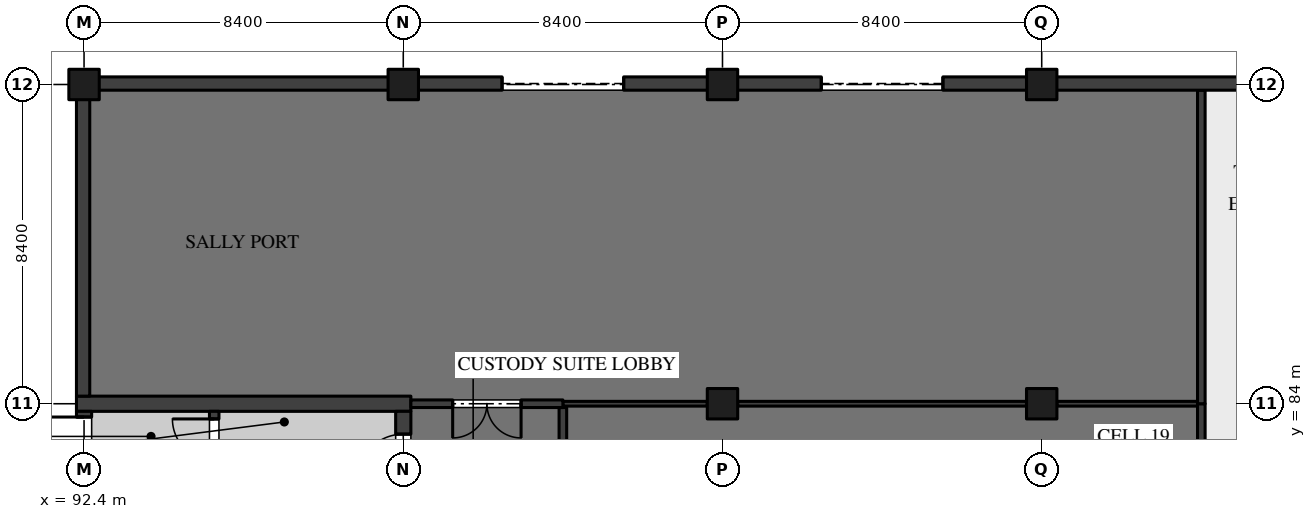
"""IFC4 building model, lengths in metres.
Left out: names, types, materials, properties, quantities, classifications, styles, units other than length and angle.
Written with IfcOpenShell. Run it as: python <this file> out.ifc"""

import sys

from ifc_helpers import new_model, si_unit, direction, frame, frame_2d, origin, origin_2d, place, context, subcontext, project, spatial, rectangle, extrude, element, fill, save


model = new_model("IFC4")
c1 = context("Model", 3, precision=1e-05, world=origin(), true_north=direction((0.0, 1.0)))
c2 = subcontext(c1, "Body", "Model", "MODEL_VIEW")
j1 = project(units=[si_unit("LENGTHUNIT", "METRE"), si_unit("PLANEANGLEUNIT", "RADIAN")], contexts=[c1])
p1 = place(None, origin())
s1 = spatial("IfcSite", under=j1, at=p1, CompositionType="ELEMENT")
p2 = place(p1, origin())
s2 = spatial("IfcBuilding", under=s1, at=p2, CompositionType="ELEMENT")
p3 = place(p2, origin())
s3 = spatial("IfcBuildingStorey", under=s2, at=p3, CompositionType="ELEMENT", Elevation=0.0)
for number, where, z_axis, x_axis in (
    (1, (92.4, 92.4, 0.0), (0.0, 0.0, 1.0), (1.0, 0.0, 0.0)),
    (2, (100.8, 92.4, 0.0), (0.0, 0.0, 1.0), (1.0, 0.0, 0.0)),
    (3, (109.2, 84.0, 0.0), (0.0, 0.0, 1.0), (1.0, 0.0, 0.0)),
    (4, (109.2, 92.4, 0.0), (0.0, 0.0, 1.0), (1.0, 0.0, 0.0)),
    (5, (117.6, 84.0, 0.0), (0.0, 0.0, 1.0), (1.0, 0.0, 0.0)),
    (6, (117.6, 92.4, 0.0), (0.0, 0.0, 1.0), (1.0, 0.0, 0.0)),
):
    element("IfcColumn", number, at=place(p3, frame(where, z_axis=z_axis, x_axis=x_axis)), inside=s3, PredefinedType="COLUMN", context=c2, shape_type="SweptSolid", body=[
        extrude(rectangle(XDim=0.8, YDim=0.8, at=origin_2d()), origin(), (0.0, 0.0, 1.0), 5.05),
    ])
p4 = place(p3, frame((92.2, 84.0, 0.0), z_axis=(0.0, 0.0, 1.0), x_axis=(1.0, 0.0, 0.0)))
e7 = element("IfcWall", 7, at=p4, inside=s3, PredefinedType="SHEAR", context=c2, shape_type="SweptSolid", body=[
    extrude(rectangle(XDim=8.8, YDim=0.4, at=frame_2d((4.4, 0.0))), origin(), (0.0, 0.0, 1.0), 5.05),
])
p5 = place(p3, frame((92.4, 75.8, 0.0), z_axis=(0.0, 0.0, 1.0), x_axis=(0.0, 1.0, 0.0)))
e8 = element("IfcWall", 8, at=p5, inside=s3, PredefinedType="SHEAR", context=c2, shape_type="SweptSolid", body=[
    extrude(rectangle(XDim=8.0, YDim=0.4, at=frame_2d((4.0, 0.0))), origin(), (0.0, 0.0, 1.0), 5.05),
])
p6 = place(p5, frame((6.65, 0.0, 0.0)))
e9 = element("IfcOpeningElement", 9, at=p6, cuts=e8, PredefinedType="OPENING", context=c2, shape_type="SweptSolid", body=[
    extrude(rectangle(XDim=1.2, YDim=2.1, at=frame_2d((0.6, 1.05))), frame((0.0, 0.21, 0.0), z_axis=(0.0, -1.0, 0.0), x_axis=(1.0, 0.0, 0.0)), (0.0, 0.0, 1.0), 0.42),
])
p7 = place(p3, frame((100.8, 75.8, 0.0), z_axis=(0.0, 0.0, 1.0), x_axis=(0.0, 1.0, 0.0)))
e10 = element("IfcWall", 10, at=p7, inside=s3, PredefinedType="SHEAR", context=c2, shape_type="SweptSolid", body=[
    extrude(rectangle(XDim=8.0, YDim=0.4, at=frame_2d((4.0, 0.0))), origin(), (0.0, 0.0, 1.0), 5.05),
])
p8 = place(p7, frame((6.2, 0.0, 0.0)))
e11 = element("IfcOpeningElement", 11, at=p8, cuts=e10, PredefinedType="OPENING", context=c2, shape_type="SweptSolid", body=[
    extrude(rectangle(XDim=1.2, YDim=2.1, at=frame_2d((0.6, 1.05))), frame((0.0, 0.21, 0.0), z_axis=(0.0, -1.0, 0.0), x_axis=(1.0, 0.0, 0.0)), (0.0, 0.0, 1.0), 0.42),
])
p9 = place(p3, frame((95.825, 83.8, 0.0), z_axis=(0.0, 0.0, 1.0), x_axis=(0.0, -1.0, 0.0)))
e12 = element("IfcWall", 12, at=p9, inside=s3, PredefinedType="SOLIDWALL", context=c2, shape_type="SweptSolid", body=[
    extrude(rectangle(XDim=8.0, YDim=0.25, at=frame_2d((4.0, 0.0))), origin(), (0.0, 0.0, 1.0), 5.05),
])
p10 = place(p9, frame((0.2, 0.0, 0.0)))
e13 = element("IfcOpeningElement", 13, at=p10, cuts=e12, PredefinedType="OPENING", context=c2, shape_type="SweptSolid", body=[
    extrude(rectangle(XDim=1.1, YDim=2.1, at=frame_2d((0.55, 1.05))), frame((0.0, 0.135, 0.0), z_axis=(0.0, -1.0, 0.0), x_axis=(1.0, 0.0, 0.0)), (0.0, 0.0, 1.0), 0.27),
])
p11 = place(p3, frame((105.0, 75.6, 0.0), z_axis=(0.0, 0.0, 1.0), x_axis=(0.0, 1.0, 0.0)))
e14 = element("IfcWall", 14, at=p11, inside=s3, PredefinedType="PARTITIONING", context=c2, shape_type="SweptSolid", body=[
    extrude(rectangle(XDim=8.3, YDim=0.2, at=frame_2d((4.15, 0.0))), origin(), (0.0, 0.0, 1.0), 5.05),
])
p12 = place(p11, frame((3.65, 0.0, 0.0)))
e15 = element("IfcOpeningElement", 15, at=p12, cuts=e14, PredefinedType="OPENING", context=c2, shape_type="SweptSolid", body=[
    extrude(rectangle(XDim=1.0, YDim=2.4, at=frame_2d((0.5, 1.2))), frame((0.0, 0.11, 0.0), z_axis=(0.0, -1.0, 0.0), x_axis=(1.0, 0.0, 0.0)), (0.0, 0.0, 1.0), 0.22),
])
p13 = place(p3, frame((105.0, 84.0, 0.0), z_axis=(0.0, 0.0, 1.0), x_axis=(1.0, 0.0, 0.0)))
e16 = element("IfcWall", 16, at=p13, inside=s3, PredefinedType="PARTITIONING", context=c2, shape_type="SweptSolid", body=[
    extrude(rectangle(XDim=3.8, YDim=0.125, at=frame_2d((1.9, 0.0))), origin(), (0.0, 0.0, 1.0), 5.05),
])
p14 = place(p3, frame((109.6, 84.0, 0.0), z_axis=(0.0, 0.0, 1.0), x_axis=(1.0, 0.0, 0.0)))
e17 = element("IfcWall", 17, at=p14, inside=s3, PredefinedType="PARTITIONING", context=c2, shape_type="SweptSolid", body=[
    extrude(rectangle(XDim=7.6, YDim=0.125, at=frame_2d((3.8, 0.0))), origin(), (0.0, 0.0, 1.0), 5.05),
])
p15 = place(p3, frame((118.0, 84.0, 0.0), z_axis=(0.0, 0.0, 1.0), x_axis=(1.0, 0.0, 0.0)))
e18 = element("IfcWall", 18, at=p15, inside=s3, PredefinedType="PARTITIONING", context=c2, shape_type="SweptSolid", body=[
    extrude(rectangle(XDim=3.7, YDim=0.125, at=frame_2d((1.85, 0.0))), origin(), (0.0, 0.0, 1.0), 5.05),
])
p16 = place(p3, frame((121.8, 75.7, 0.0), z_axis=(0.0, 0.0, 1.0), x_axis=(0.0, 1.0, 0.0)))
e19 = element("IfcWall", 19, at=p16, inside=s3, PredefinedType="PARTITIONING", context=c2, shape_type="SweptSolid", body=[
    extrude(rectangle(XDim=8.3, YDim=0.2, at=frame_2d((4.15, 0.0))), origin(), (0.0, 0.0, 1.0), 5.05),
])
p17 = place(p3, frame((101.0, 84.0, 0.0), z_axis=(0.0, 0.0, 1.0), x_axis=(1.0, 0.0, 0.0)))
e20 = element("IfcWall", 20, at=p17, inside=s3, PredefinedType="PARTITIONING", context=c2, shape_type="SweptSolid", body=[
    extrude(rectangle(XDim=4.0, YDim=0.2, at=frame_2d((2.0, 0.0))), origin(), (0.0, 0.0, 1.0), 5.05),
])
p18 = place(p17, frame((1.1, 0.0, 0.0)))
e21 = element("IfcOpeningElement", 21, at=p18, cuts=e20, PredefinedType="OPENING", context=c2, shape_type="SweptSolid", body=[
    extrude(rectangle(XDim=1.8, YDim=2.1, at=frame_2d((0.9, 1.05))), frame((0.0, 0.11, 0.0), z_axis=(0.0, -1.0, 0.0), x_axis=(1.0, 0.0, 0.0)), (0.0, 0.0, 1.0), 0.22),
])
p19 = place(p3, frame((121.8, 84.0, 0.0), z_axis=(0.0, 0.0, 1.0), x_axis=(0.0, 1.0, 0.0)))
e22 = element("IfcWall", 22, at=p19, inside=s3, PredefinedType="PARTITIONING", context=c2, shape_type="SweptSolid", body=[
    extrude(rectangle(XDim=8.25, YDim=0.2, at=frame_2d((4.125, 0.0))), origin(), (0.0, 0.0, 1.0), 5.05),
])
p20 = place(p3, frame((125.62, 92.425, 0.0), z_axis=(0.0, 0.0, 1.0), x_axis=(-1.0, 0.0, 0.0)))
e23 = element("IfcWall", 23, at=p20, inside=s3, PredefinedType="SOLIDWALL", context=c2, shape_type="SweptSolid", body=[
    extrude(rectangle(XDim=7.64, YDim=0.35, at=frame_2d((3.82, 0.0))), origin(), (0.0, 0.0, 1.0), 5.05),
])
p21 = place(p20, frame((0.82, 0.0, 0.0)))
e24 = element("IfcOpeningElement", 24, at=p21, cuts=e23, PredefinedType="OPENING", context=c2, shape_type="SweptSolid", body=[
    extrude(rectangle(XDim=1.8, YDim=2.4, at=frame_2d((0.9, 1.2))), frame((0.0, 0.185, 0.0), z_axis=(0.0, -1.0, 0.0), x_axis=(1.0, 0.0, 0.0)), (0.0, 0.0, 1.0), 0.37),
])
p22 = place(p3, frame((117.22, 92.425, 0.0), z_axis=(0.0, 0.0, 1.0), x_axis=(-1.0, 0.0, 0.0)))
e25 = element("IfcWall", 25, at=p22, inside=s3, PredefinedType="SOLIDWALL", context=c2, shape_type="SweptSolid", body=[
    extrude(rectangle(XDim=7.64, YDim=0.35, at=frame_2d((3.82, 0.0))), origin(), (0.0, 0.0, 1.0), 5.05),
])
p23 = place(p22, frame((2.22, 0.0, 0.0)))
e26 = element("IfcOpeningElement", 26, at=p23, cuts=e25, PredefinedType="OPENING", context=c2, shape_type="SweptSolid", body=[
    extrude(rectangle(XDim=3.2, YDim=4.5, at=frame_2d((1.6, 2.25))), frame((0.0, 0.185, 0.0), z_axis=(0.0, -1.0, 0.0), x_axis=(1.0, 0.0, 0.0)), (0.0, 0.0, 1.0), 0.37),
])
p24 = place(p3, frame((108.82, 92.425, 0.0), z_axis=(0.0, 0.0, 1.0), x_axis=(-1.0, 0.0, 0.0)))
e27 = element("IfcWall", 27, at=p24, inside=s3, PredefinedType="SOLIDWALL", context=c2, shape_type="SweptSolid", body=[
    extrude(rectangle(XDim=7.64, YDim=0.35, at=frame_2d((3.82, 0.0))), origin(), (0.0, 0.0, 1.0), 5.05),
])
p25 = place(p24, frame((2.22, 0.0, 0.0)))
e28 = element("IfcOpeningElement", 28, at=p25, cuts=e27, PredefinedType="OPENING", context=c2, shape_type="SweptSolid", body=[
    extrude(rectangle(XDim=3.2, YDim=4.5, at=frame_2d((1.6, 2.25))), frame((0.0, 0.185, 0.0), z_axis=(0.0, -1.0, 0.0), x_axis=(1.0, 0.0, 0.0)), (0.0, 0.0, 1.0), 0.37),
])
p26 = place(p3, frame((100.42, 92.425, 0.0), z_axis=(0.0, 0.0, 1.0), x_axis=(-1.0, 0.0, 0.0)))
e29 = element("IfcWall", 29, at=p26, inside=s3, PredefinedType="SOLIDWALL", context=c2, shape_type="SweptSolid", body=[
    extrude(rectangle(XDim=7.64, YDim=0.35, at=frame_2d((3.82, 0.0))), origin(), (0.0, 0.0, 1.0), 5.05),
])
p27 = place(p3, frame((92.375, 92.02, 0.0), z_axis=(0.0, 0.0, 1.0), x_axis=(0.0, -1.0, 0.0)))
e30 = element("IfcWall", 30, at=p27, inside=s3, PredefinedType="SOLIDWALL", context=c2, shape_type="SweptSolid", body=[
    extrude(rectangle(XDim=7.82, YDim=0.35, at=frame_2d((3.91, 0.0))), origin(), (0.0, 0.0, 1.0), 5.05),
])
p28 = place(p8, origin())
e31 = element("IfcDoor", 31, at=p28, inside=s3, OperationType="SINGLE_SWING_RIGHT", PredefinedType="DOOR", context=c2, shape_type="SweptSolid", body=[
    extrude(rectangle(XDim=1.2, YDim=2.1, at=frame_2d((0.6, 1.05))), frame((0.0, 0.035, 0.0), z_axis=(0.0, -1.0, 0.0), x_axis=(1.0, 0.0, 0.0)), (0.0, 0.0, 1.0), 0.07),
])
fill(e11, e31)
p29 = place(p10, frame((1.1, 0.0, 0.0), z_axis=(0.0, 0.0, 1.0), x_axis=(-1.0, 0.0, 0.0)))
e32 = element("IfcDoor", 32, at=p29, inside=s3, OperationType="SINGLE_SWING_LEFT", PredefinedType="DOOR", context=c2, shape_type="SweptSolid", body=[
    extrude(rectangle(XDim=1.1, YDim=2.1, at=frame_2d((0.55, 1.05))), frame((0.0, 0.035, 0.0), z_axis=(0.0, -1.0, 0.0), x_axis=(1.0, 0.0, 0.0)), (0.0, 0.0, 1.0), 0.07),
])
fill(e13, e32)
p30 = place(p6, origin())
e33 = element("IfcDoor", 33, at=p30, inside=s3, OperationType="SINGLE_SWING_LEFT", PredefinedType="DOOR", context=c2, shape_type="SweptSolid", body=[
    extrude(rectangle(XDim=1.2, YDim=2.1, at=frame_2d((0.6, 1.05))), frame((0.0, 0.035, 0.0), z_axis=(0.0, -1.0, 0.0), x_axis=(1.0, 0.0, 0.0)), (0.0, 0.0, 1.0), 0.07),
])
fill(e9, e33)
p31 = place(p18, frame((1.8, 0.0, 0.0), z_axis=(0.0, 0.0, 1.0), x_axis=(-1.0, 0.0, 0.0)))
e34 = element("IfcDoor", 34, at=p31, inside=s3, OperationType="DOUBLE_DOOR_SINGLE_SWING", PredefinedType="DOOR", context=c2, shape_type="SweptSolid", body=[
    extrude(rectangle(XDim=1.8, YDim=2.1, at=frame_2d((0.9, 1.05))), frame((0.0, 0.03, 0.0), z_axis=(0.0, -1.0, 0.0), x_axis=(1.0, 0.0, 0.0)), (0.0, 0.0, 1.0), 0.06),
])
fill(e21, e34)
p32 = place(p23, frame((3.2, 0.0, 0.0), z_axis=(0.0, 0.0, 1.0), x_axis=(-1.0, 0.0, 0.0)))
e35 = element("IfcDoor", 35, at=p32, inside=s3, OperationType="ROLLINGUP", PredefinedType="GATE", context=c2, shape_type="SweptSolid", body=[
    extrude(rectangle(XDim=3.2, YDim=4.5, at=frame_2d((1.6, 2.25))), frame((0.0, 0.025, 0.0), z_axis=(0.0, -1.0, 0.0), x_axis=(1.0, 0.0, 0.0)), (0.0, 0.0, 1.0), 0.05),
])
fill(e26, e35)
p33 = place(p25, frame((3.2, 0.0, 0.0), z_axis=(0.0, 0.0, 1.0), x_axis=(-1.0, 0.0, 0.0)))
e36 = element("IfcDoor", 36, at=p33, inside=s3, OperationType="ROLLINGUP", PredefinedType="GATE", context=c2, shape_type="SweptSolid", body=[
    extrude(rectangle(XDim=3.2, YDim=4.5, at=frame_2d((1.6, 2.25))), frame((0.0, 0.025, 0.0), z_axis=(0.0, -1.0, 0.0), x_axis=(1.0, 0.0, 0.0)), (0.0, 0.0, 1.0), 0.05),
])
fill(e28, e36)
save(model, sys.argv[1])
